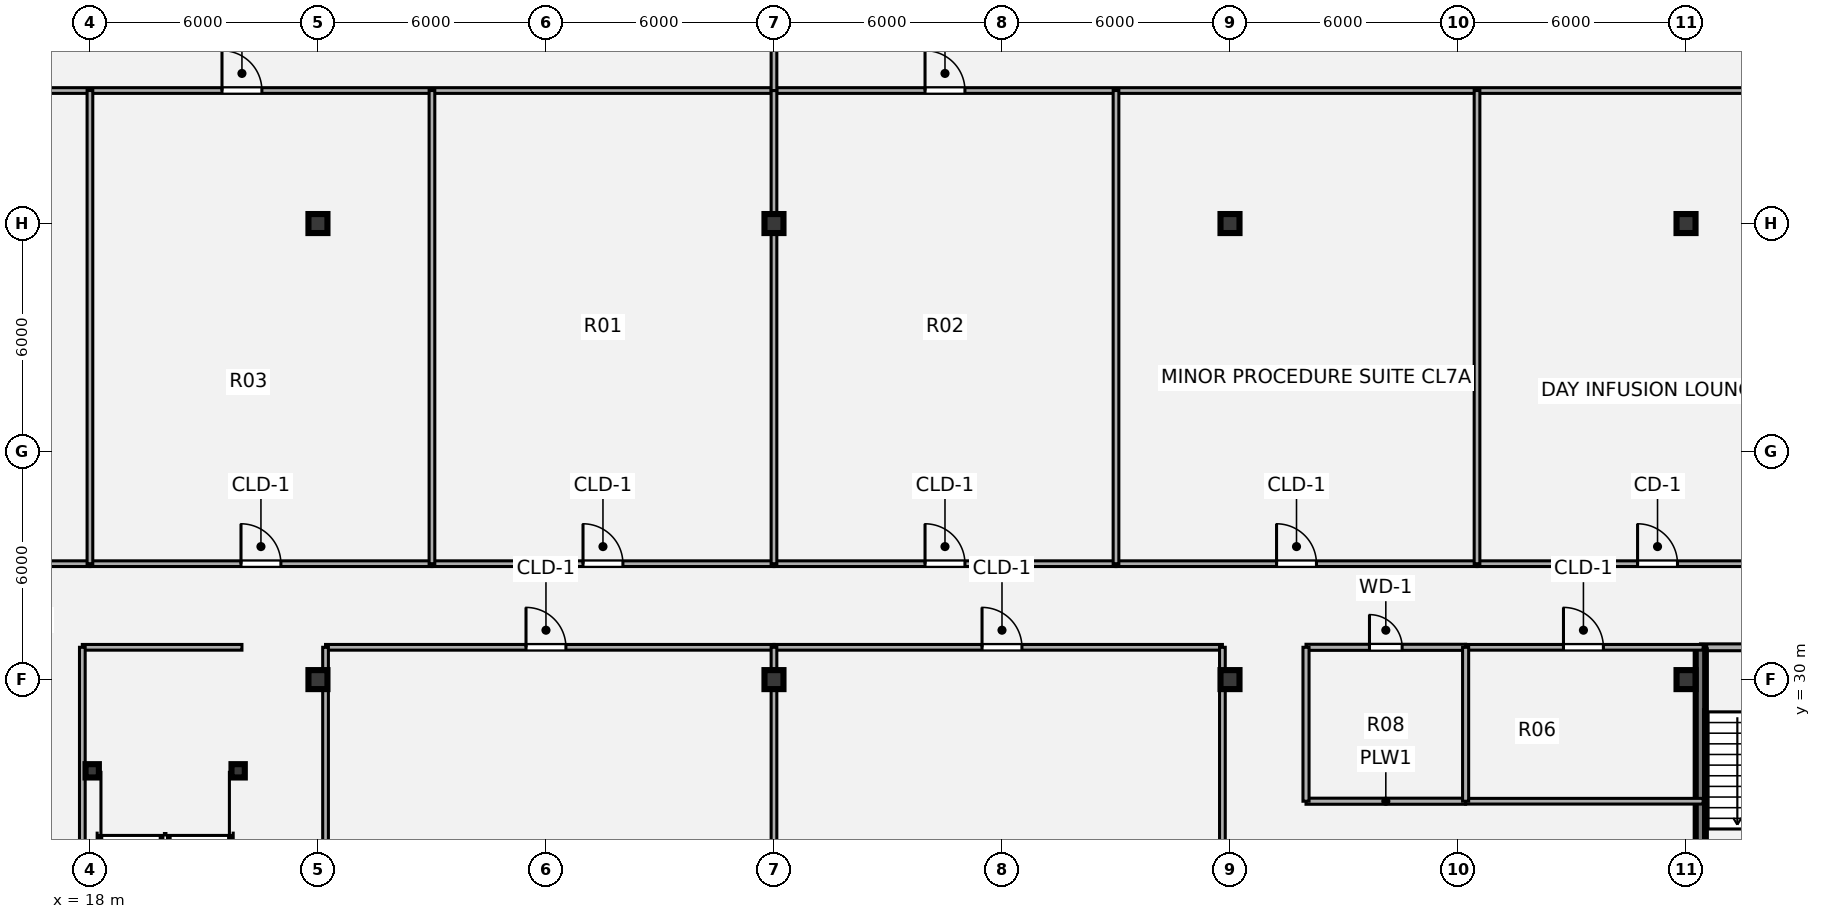
"""IFC4 building model, lengths in metres.
Left out: names, types, materials, properties, quantities, classifications, styles, units other than length and angle.
Written with IfcOpenShell. Run it as: python <this file> out.ifc"""

import sys

from ifc_helpers import new_model, si_unit, direction, frame, frame_2d, origin, origin_2d, place, context, subcontext, project, spatial, rectangle, hollow_rectangle, i_section, extrude, source, transform, mapped, element, fill, save


model = new_model("IFC4")
c1 = context("Model", 3, precision=1e-05, world=origin(), true_north=direction((0.0, 1.0)))
c2 = subcontext(c1, "Body", "Model", "MODEL_VIEW")
j1 = project(units=[si_unit("LENGTHUNIT", "METRE"), si_unit("PLANEANGLEUNIT", "RADIAN")], contexts=[c1])
p1 = place(None, origin())
s1 = spatial("IfcSite", under=j1, at=p1, CompositionType="ELEMENT")
p2 = place(p1, origin())
s2 = spatial("IfcBuilding", under=s1, at=p2, CompositionType="ELEMENT")
p3 = place(p2, frame((0.0, 0.0, 5.4)))
s3 = spatial("IfcBuildingStorey", under=s2, at=p3, CompositionType="ELEMENT", Elevation=5.4)
m1 = source(origin(), c2, "Body", "SweptSolid", [
    extrude(i_section(OverallWidth=0.5, OverallDepth=0.5, WebThickness=0.028, FlangeThickness=0.045, at=origin_2d()), origin(), (0.0, 0.0, 1.0), 4.32),
])
for number, where, z_axis, x_axis in (
    (1, (24.0, 30.0, 0.0), (0.0, 0.0, 1.0), (1.0, 0.0, 0.0)),
    (2, (36.0, 30.0, 0.0), (0.0, 0.0, 1.0), (1.0, 0.0, 0.0)),
    (3, (48.0, 30.0, 0.0), (0.0, 0.0, 1.0), (1.0, 0.0, 0.0)),
    (4, (60.0, 30.0, 0.0), (0.0, 0.0, 1.0), (1.0, 0.0, 0.0)),
    (5, (24.0, 42.0, 0.0), (0.0, 0.0, 1.0), (1.0, 0.0, 0.0)),
    (6, (36.0, 42.0, 0.0), (0.0, 0.0, 1.0), (1.0, 0.0, 0.0)),
    (7, (48.0, 42.0, 0.0), (0.0, 0.0, 1.0), (1.0, 0.0, 0.0)),
    (8, (60.0, 42.0, 0.0), (0.0, 0.0, 1.0), (1.0, 0.0, 0.0)),
):
    element("IfcColumn", number, at=place(p3, frame(where, z_axis=z_axis, x_axis=x_axis)), inside=s3, PredefinedType="COLUMN", context=c2, shape_type="MappedRepresentation", body=[
        mapped(m1, transform((0.0, 0.0, 0.0), x_axis=(1.0, 0.0, 0.0), y_axis=(0.0, 1.0, 0.0), z_axis=(0.0, 0.0, 1.0), scale=1.0)),
    ])
m2 = source(origin(), c2, "Body", "SweptSolid", [
    extrude(hollow_rectangle(XDim=0.35, YDim=0.35, WallThickness=0.016, OuterFilletRadius=0.032, at=origin_2d()), origin(), (0.0, 0.0, 1.0), 4.32),
])
for number, where, z_axis, x_axis in (
    (9, (18.06, 27.6, 0.0), (0.0, 0.0, 1.0), (1.0, 0.0, 0.0)),
    (10, (21.9, 27.6, 0.0), (0.0, 0.0, 1.0), (1.0, 0.0, 0.0)),
):
    element("IfcColumn", number, at=place(p3, frame(where, z_axis=z_axis, x_axis=x_axis)), inside=s3, PredefinedType="COLUMN", context=c2, shape_type="MappedRepresentation", body=[
        mapped(m2, transform((0.0, 0.0, 0.0), x_axis=(1.0, 0.0, 0.0), y_axis=(0.0, 1.0, 0.0), z_axis=(0.0, 0.0, 1.0), scale=1.0)),
    ])
p4 = place(p3, frame((60.38, 30.85, 0.0), z_axis=(0.0, 0.0, 1.0), x_axis=(1.0, 0.0, 0.0)))
e11 = element("IfcWall", 11, at=p4, inside=s3, PredefinedType="PARTITIONING", context=c2, shape_type="SweptSolid", body=[
    extrude(rectangle(XDim=3.74, YDim=0.18, at=frame_2d((1.87, 0.0))), origin(), (0.0, 0.0, 1.0), 4.04),
])
p5 = place(p4, frame((1.35, 0.0, 0.0)))
e12 = element("IfcOpeningElement", 12, at=p5, cuts=e11, PredefinedType="OPENING", context=c2, shape_type="SweptSolid", body=[
    extrude(rectangle(XDim=1.1, YDim=2.1, at=origin_2d()), frame((0.55, 0.1, 1.05), z_axis=(0.0, -1.0, 0.0), x_axis=(1.0, 0.0, 0.0)), (0.0, 0.0, 1.0), 0.2),
])
p6 = place(p3, frame((60.38, 23.38, 0.0), z_axis=(0.0, 0.0, 1.0), x_axis=(0.0, 1.0, 0.0)))
e13 = element("IfcWall", 13, at=p6, inside=s3, PredefinedType="SHEAR", context=c2, shape_type="SweptSolid", body=[
    extrude(rectangle(XDim=7.47, YDim=0.25, at=frame_2d((3.735, 0.0))), origin(), (0.0, 0.0, 1.0), 4.32),
])
p7 = place(p3, frame((50.0, 26.8, 0.0), z_axis=(0.0, 0.0, 1.0), x_axis=(1.0, 0.0, 0.0)))
e14 = element("IfcWall", 14, at=p7, inside=s3, PredefinedType="PLUMBINGWALL", context=c2, shape_type="SweptSolid", body=[
    extrude(rectangle(XDim=4.2, YDim=0.16, at=frame_2d((2.1, 0.0))), origin(), (0.0, 0.0, 1.0), 4.01),
])
p8 = place(p3, frame((54.2, 26.8, 0.0), z_axis=(0.0, 0.0, 1.0), x_axis=(1.0, 0.0, 0.0)))
e15 = element("IfcWall", 15, at=p8, inside=s3, PredefinedType="PARTITIONING", context=c2, shape_type="SweptSolid", body=[
    extrude(rectangle(XDim=6.25, YDim=0.15, at=frame_2d((3.125, 0.0))), origin(), (0.0, 0.0, 1.0), 4.01),
])
p9 = place(p3, frame((17.8, 30.85, 0.0), z_axis=(0.0, 0.0, 1.0), x_axis=(1.0, 0.0, 0.0)))
e16 = element("IfcWall", 16, at=p9, inside=s3, PredefinedType="PARTITIONING", context=c2, shape_type="SweptSolid", body=[
    extrude(rectangle(XDim=4.2, YDim=0.15, at=frame_2d((2.1, 0.0))), origin(), (0.0, 0.0, 1.0), 4.01),
])
p10 = place(p3, frame((24.2, 30.85, 0.0), z_axis=(0.0, 0.0, 1.0), x_axis=(1.0, 0.0, 0.0)))
e17 = element("IfcWall", 17, at=p10, inside=s3, PredefinedType="PARTITIONING", context=c2, shape_type="SweptSolid", body=[
    extrude(rectangle(XDim=11.8, YDim=0.15, at=frame_2d((5.9, 0.0))), origin(), (0.0, 0.0, 1.0), 4.01),
])
p11 = place(p10, frame((5.275, 0.0, 0.0)))
e18 = element("IfcOpeningElement", 18, at=p11, cuts=e17, PredefinedType="OPENING", context=c2, shape_type="SweptSolid", body=[
    extrude(rectangle(XDim=1.05, YDim=2.1, at=origin_2d()), frame((0.525, 0.085, 1.05), z_axis=(0.0, -1.0, 0.0), x_axis=(1.0, 0.0, 0.0)), (0.0, 0.0, 1.0), 0.17),
])
p12 = place(p3, frame((36.0, 30.85, 0.0), z_axis=(0.0, 0.0, 1.0), x_axis=(1.0, 0.0, 0.0)))
e19 = element("IfcWall", 19, at=p12, inside=s3, PredefinedType="PARTITIONING", context=c2, shape_type="SweptSolid", body=[
    extrude(rectangle(XDim=11.8, YDim=0.15, at=frame_2d((5.9, 0.0))), origin(), (0.0, 0.0, 1.0), 4.01),
])
p13 = place(p12, frame((5.475, 0.0, 0.0)))
e20 = element("IfcOpeningElement", 20, at=p13, cuts=e19, PredefinedType="OPENING", context=c2, shape_type="SweptSolid", body=[
    extrude(rectangle(XDim=1.05, YDim=2.1, at=origin_2d()), frame((0.525, 0.085, 1.05), z_axis=(0.0, -1.0, 0.0), x_axis=(1.0, 0.0, 0.0)), (0.0, 0.0, 1.0), 0.17),
])
p14 = place(p3, frame((50.0, 30.85, 0.0), z_axis=(0.0, 0.0, 1.0), x_axis=(1.0, 0.0, 0.0)))
e21 = element("IfcWall", 21, at=p14, inside=s3, PredefinedType="PLUMBINGWALL", context=c2, shape_type="SweptSolid", body=[
    extrude(rectangle(XDim=4.2, YDim=0.16, at=frame_2d((2.1, 0.0))), origin(), (0.0, 0.0, 1.0), 4.01),
])
p15 = place(p14, frame((1.67, 0.0, 0.0)))
e22 = element("IfcOpeningElement", 22, at=p15, cuts=e21, PredefinedType="OPENING", context=c2, shape_type="SweptSolid", body=[
    extrude(rectangle(XDim=0.86, YDim=2.1, at=origin_2d()), frame((0.43, 0.09, 1.05), z_axis=(0.0, -1.0, 0.0), x_axis=(1.0, 0.0, 0.0)), (0.0, 0.0, 1.0), 0.18),
])
p16 = place(p3, frame((54.2, 30.85, 0.0), z_axis=(0.0, 0.0, 1.0), x_axis=(1.0, 0.0, 0.0)))
e23 = element("IfcWall", 23, at=p16, inside=s3, PredefinedType="PARTITIONING", context=c2, shape_type="SweptSolid", body=[
    extrude(rectangle(XDim=6.25, YDim=0.15, at=frame_2d((3.125, 0.0))), origin(), (0.0, 0.0, 1.0), 4.01),
])
p17 = place(p16, frame((2.575, 0.0, 0.0)))
e24 = element("IfcOpeningElement", 24, at=p17, cuts=e23, PredefinedType="OPENING", context=c2, shape_type="SweptSolid", body=[
    extrude(rectangle(XDim=1.05, YDim=2.1, at=origin_2d()), frame((0.525, 0.085, 1.05), z_axis=(0.0, -1.0, 0.0), x_axis=(1.0, 0.0, 0.0)), (0.0, 0.0, 1.0), 0.17),
])
p18 = place(p3, frame((7.08, 33.05, 0.0), z_axis=(0.0, 0.0, 1.0), x_axis=(1.0, 0.0, 0.0)))
e25 = element("IfcWall", 25, at=p18, inside=s3, PredefinedType="PARTITIONING", context=c2, shape_type="SweptSolid", body=[
    extrude(rectangle(XDim=10.92, YDim=0.15, at=frame_2d((5.46, 0.0))), origin(), (0.0, 0.0, 1.0), 4.01),
])
p19 = place(p18, frame((5.895, 0.0, 0.0)))
e26 = element("IfcOpeningElement", 26, at=p19, cuts=e25, PredefinedType="OPENING", context=c2, shape_type="SweptSolid", body=[
    extrude(rectangle(XDim=1.05, YDim=2.1, at=origin_2d()), frame((0.525, 0.085, 1.05), z_axis=(0.0, -1.0, 0.0), x_axis=(1.0, 0.0, 0.0)), (0.0, 0.0, 1.0), 0.17),
])
p20 = place(p3, frame((18.0, 33.05, 0.0), z_axis=(0.0, 0.0, 1.0), x_axis=(1.0, 0.0, 0.0)))
e27 = element("IfcWall", 27, at=p20, inside=s3, PredefinedType="PARTITIONING", context=c2, shape_type="SweptSolid", body=[
    extrude(rectangle(XDim=9.0, YDim=0.15, at=frame_2d((4.5, 0.0))), origin(), (0.0, 0.0, 1.0), 4.01),
])
p21 = place(p20, frame((3.975, 0.0, 0.0)))
e28 = element("IfcOpeningElement", 28, at=p21, cuts=e27, PredefinedType="OPENING", context=c2, shape_type="SweptSolid", body=[
    extrude(rectangle(XDim=1.05, YDim=2.1, at=origin_2d()), frame((0.525, 0.085, 1.05), z_axis=(0.0, -1.0, 0.0), x_axis=(1.0, 0.0, 0.0)), (0.0, 0.0, 1.0), 0.17),
])
p22 = place(p3, frame((27.0, 33.05, 0.0), z_axis=(0.0, 0.0, 1.0), x_axis=(1.0, 0.0, 0.0)))
e29 = element("IfcWall", 29, at=p22, inside=s3, PredefinedType="PARTITIONING", context=c2, shape_type="SweptSolid", body=[
    extrude(rectangle(XDim=9.0, YDim=0.15, at=frame_2d((4.5, 0.0))), origin(), (0.0, 0.0, 1.0), 4.01),
])
p23 = place(p22, frame((3.975, 0.0, 0.0)))
e30 = element("IfcOpeningElement", 30, at=p23, cuts=e29, PredefinedType="OPENING", context=c2, shape_type="SweptSolid", body=[
    extrude(rectangle(XDim=1.05, YDim=2.1, at=origin_2d()), frame((0.525, 0.085, 1.05), z_axis=(0.0, -1.0, 0.0), x_axis=(1.0, 0.0, 0.0)), (0.0, 0.0, 1.0), 0.17),
])
p24 = place(p3, frame((36.0, 33.05, 0.0), z_axis=(0.0, 0.0, 1.0), x_axis=(1.0, 0.0, 0.0)))
e31 = element("IfcWall", 31, at=p24, inside=s3, PredefinedType="PARTITIONING", context=c2, shape_type="SweptSolid", body=[
    extrude(rectangle(XDim=9.0, YDim=0.15, at=frame_2d((4.5, 0.0))), origin(), (0.0, 0.0, 1.0), 4.01),
])
p25 = place(p24, frame((3.975, 0.0, 0.0)))
e32 = element("IfcOpeningElement", 32, at=p25, cuts=e31, PredefinedType="OPENING", context=c2, shape_type="SweptSolid", body=[
    extrude(rectangle(XDim=1.05, YDim=2.1, at=origin_2d()), frame((0.525, 0.085, 1.05), z_axis=(0.0, -1.0, 0.0), x_axis=(1.0, 0.0, 0.0)), (0.0, 0.0, 1.0), 0.17),
])
p26 = place(p3, frame((45.0, 33.05, 0.0), z_axis=(0.0, 0.0, 1.0), x_axis=(1.0, 0.0, 0.0)))
e33 = element("IfcWall", 33, at=p26, inside=s3, PredefinedType="PARTITIONING", context=c2, shape_type="SweptSolid", body=[
    extrude(rectangle(XDim=9.5, YDim=0.15, at=frame_2d((4.75, 0.0))), origin(), (0.0, 0.0, 1.0), 4.01),
])
p27 = place(p26, frame((4.225, 0.0, 0.0)))
e34 = element("IfcOpeningElement", 34, at=p27, cuts=e33, PredefinedType="OPENING", context=c2, shape_type="SweptSolid", body=[
    extrude(rectangle(XDim=1.05, YDim=2.1, at=origin_2d()), frame((0.525, 0.085, 1.05), z_axis=(0.0, -1.0, 0.0), x_axis=(1.0, 0.0, 0.0)), (0.0, 0.0, 1.0), 0.17),
])
p28 = place(p3, frame((54.5, 33.05, 0.0), z_axis=(0.0, 0.0, 1.0), x_axis=(1.0, 0.0, 0.0)))
e35 = element("IfcWall", 35, at=p28, inside=s3, PredefinedType="PARTITIONING", context=c2, shape_type="SweptSolid", body=[
    extrude(rectangle(XDim=10.42, YDim=0.15, at=frame_2d((5.21, 0.0))), origin(), (0.0, 0.0, 1.0), 4.01),
])
p29 = place(p28, frame((4.225, 0.0, 0.0)))
e36 = element("IfcOpeningElement", 36, at=p29, cuts=e35, PredefinedType="OPENING", context=c2, shape_type="SweptSolid", body=[
    extrude(rectangle(XDim=1.05, YDim=2.1, at=origin_2d()), frame((0.525, 0.085, 1.05), z_axis=(0.0, -1.0, 0.0), x_axis=(1.0, 0.0, 0.0)), (0.0, 0.0, 1.0), 0.17),
])
p30 = place(p3, frame((7.08, 45.5, 0.0), z_axis=(0.0, 0.0, 1.0), x_axis=(1.0, 0.0, 0.0)))
e37 = element("IfcWall", 37, at=p30, inside=s3, PredefinedType="PARTITIONING", context=c2, shape_type="SweptSolid", body=[
    extrude(rectangle(XDim=28.92, YDim=0.15, at=frame_2d((14.46, 0.0))), origin(), (0.0, 0.0, 1.0), 4.01),
])
p31 = place(p30, frame((14.395, 0.0, 0.0)))
e38 = element("IfcOpeningElement", 38, at=p31, cuts=e37, PredefinedType="OPENING", context=c2, shape_type="SweptSolid", body=[
    extrude(rectangle(XDim=1.05, YDim=2.1, at=origin_2d()), frame((0.525, 0.085, 1.05), z_axis=(0.0, -1.0, 0.0), x_axis=(1.0, 0.0, 0.0)), (0.0, 0.0, 1.0), 0.17),
])
p32 = place(p3, frame((36.0, 45.5, 0.0), z_axis=(0.0, 0.0, 1.0), x_axis=(1.0, 0.0, 0.0)))
e39 = element("IfcWall", 39, at=p32, inside=s3, PredefinedType="PARTITIONING", context=c2, shape_type="SweptSolid", body=[
    extrude(rectangle(XDim=28.92, YDim=0.15, at=frame_2d((14.46, 0.0))), origin(), (0.0, 0.0, 1.0), 4.01),
])
p33 = place(p32, frame((3.975, 0.0, 0.0)))
e40 = element("IfcOpeningElement", 40, at=p33, cuts=e39, PredefinedType="OPENING", context=c2, shape_type="SweptSolid", body=[
    extrude(rectangle(XDim=1.05, YDim=2.1, at=origin_2d()), frame((0.525, 0.085, 1.05), z_axis=(0.0, -1.0, 0.0), x_axis=(1.0, 0.0, 0.0)), (0.0, 0.0, 1.0), 0.17),
])
p34 = place(p3, frame((17.8, 20.22, 0.0), z_axis=(0.0, 0.0, 1.0), x_axis=(0.0, 1.0, 0.0)))
e41 = element("IfcWall", 41, at=p34, inside=s3, PredefinedType="PARTITIONING", context=c2, shape_type="SweptSolid", body=[
    extrude(rectangle(XDim=10.63, YDim=0.15, at=frame_2d((5.315, 0.0))), origin(), (0.0, 0.0, 1.0), 3.666),
])
p35 = place(p3, frame((18.0, 33.05, 0.0), z_axis=(0.0, 0.0, 1.0), x_axis=(0.0, 1.0, 0.0)))
e42 = element("IfcWall", 42, at=p35, inside=s3, PredefinedType="PARTITIONING", context=c2, shape_type="SweptSolid", body=[
    extrude(rectangle(XDim=12.45, YDim=0.15, at=frame_2d((6.225, 0.0))), origin(), (0.0, 0.0, 1.0), 3.666),
])
p36 = place(p3, frame((24.2, 20.22, 0.0), z_axis=(0.0, 0.0, 1.0), x_axis=(0.0, 1.0, 0.0)))
e43 = element("IfcWall", 43, at=p36, inside=s3, PredefinedType="PARTITIONING", context=c2, shape_type="SweptSolid", body=[
    extrude(rectangle(XDim=10.63, YDim=0.15, at=frame_2d((5.315, 0.0))), origin(), (0.0, 0.0, 1.0), 3.225),
])
p37 = place(p3, frame((27.0, 33.05, 0.0), z_axis=(0.0, 0.0, 1.0), x_axis=(0.0, 1.0, 0.0)))
e44 = element("IfcWall", 44, at=p37, inside=s3, PredefinedType="PARTITIONING", context=c2, shape_type="SweptSolid", body=[
    extrude(rectangle(XDim=12.45, YDim=0.15, at=frame_2d((6.225, 0.0))), origin(), (0.0, 0.0, 1.0), 3.666),
])
p38 = place(p3, frame((36.0, 20.22, 0.0), z_axis=(0.0, 0.0, 1.0), x_axis=(0.0, 1.0, 0.0)))
e45 = element("IfcWall", 45, at=p38, inside=s3, PredefinedType="PARTITIONING", context=c2, shape_type="SweptSolid", body=[
    extrude(rectangle(XDim=10.63, YDim=0.15, at=frame_2d((5.315, 0.0))), origin(), (0.0, 0.0, 1.0), 3.225),
])
p39 = place(p3, frame((36.0, 33.05, 0.0), z_axis=(0.0, 0.0, 1.0), x_axis=(0.0, 1.0, 0.0)))
e46 = element("IfcWall", 46, at=p39, inside=s3, PredefinedType="PARTITIONING", context=c2, shape_type="SweptSolid", body=[
    extrude(rectangle(XDim=12.45, YDim=0.15, at=frame_2d((6.225, 0.0))), origin(), (0.0, 0.0, 1.0), 3.225),
])
p40 = place(p3, frame((36.0, 45.5, 0.0), z_axis=(0.0, 0.0, 1.0), x_axis=(0.0, 1.0, 0.0)))
e47 = element("IfcWall", 47, at=p40, inside=s3, PredefinedType="PARTITIONING", context=c2, shape_type="SweptSolid", body=[
    extrude(rectangle(XDim=13.02, YDim=0.15, at=frame_2d((6.51, 0.0))), origin(), (0.0, 0.0, 1.0), 3.225),
])
p41 = place(p3, frame((45.0, 33.05, 0.0), z_axis=(0.0, 0.0, 1.0), x_axis=(0.0, 1.0, 0.0)))
e48 = element("IfcWall", 48, at=p41, inside=s3, PredefinedType="PARTITIONING", context=c2, shape_type="SweptSolid", body=[
    extrude(rectangle(XDim=12.45, YDim=0.15, at=frame_2d((6.225, 0.0))), origin(), (0.0, 0.0, 1.0), 3.666),
])
p42 = place(p3, frame((47.8, 20.22, 0.0), z_axis=(0.0, 0.0, 1.0), x_axis=(0.0, 1.0, 0.0)))
e49 = element("IfcWall", 49, at=p42, inside=s3, PredefinedType="PARTITIONING", context=c2, shape_type="SweptSolid", body=[
    extrude(rectangle(XDim=10.63, YDim=0.15, at=frame_2d((5.315, 0.0))), origin(), (0.0, 0.0, 1.0), 3.225),
])
for number, where, z_axis, x_axis in (
    (50, (50.0, 26.8, 0.0), (0.0, 0.0, 1.0), (0.0, 1.0, 0.0)),
    (51, (54.2, 26.8, 0.0), (0.0, 0.0, 1.0), (0.0, 1.0, 0.0)),
):
    element("IfcWall", number, at=place(p3, frame(where, z_axis=z_axis, x_axis=x_axis)), inside=s3, PredefinedType="PLUMBINGWALL", context=c2, shape_type="SweptSolid", body=[
        extrude(rectangle(XDim=4.05, YDim=0.16, at=frame_2d((2.025, 0.0))), origin(), (0.0, 0.0, 1.0), 3.666),
    ])
p43 = place(p3, frame((54.5, 33.05, 0.0), z_axis=(0.0, 0.0, 1.0), x_axis=(0.0, 1.0, 0.0)))
e52 = element("IfcWall", 52, at=p43, inside=s3, PredefinedType="PARTITIONING", context=c2, shape_type="SweptSolid", body=[
    extrude(rectangle(XDim=12.45, YDim=0.15, at=frame_2d((6.225, 0.0))), origin(), (0.0, 0.0, 1.0), 3.666),
])
m3 = source(origin(), c2, "Body", "SweptSolid", [
    extrude(rectangle(XDim=1.05, YDim=2.1, at=origin_2d()), frame((0.525, 0.025, 1.05), z_axis=(0.0, -1.0, 0.0), x_axis=(1.0, 0.0, 0.0)), (0.0, 0.0, 1.0), 0.05),
])
p44 = place(p11, origin())
e53 = element("IfcDoor", 53, at=p44, inside=s3, OperationType="SINGLE_SWING_LEFT", PredefinedType="DOOR", context=c2, shape_type="MappedRepresentation", body=[
    mapped(m3, transform((0.0, 0.0, 0.0), x_axis=(1.0, 0.0, 0.0), y_axis=(0.0, 1.0, 0.0), z_axis=(0.0, 0.0, 1.0), scale=1.0)),
])
fill(e18, e53)
p45 = place(p13, origin())
e54 = element("IfcDoor", 54, at=p45, inside=s3, OperationType="SINGLE_SWING_LEFT", PredefinedType="DOOR", context=c2, shape_type="MappedRepresentation", body=[
    mapped(m3, transform((0.0, 0.0, 0.0), x_axis=(1.0, 0.0, 0.0), y_axis=(0.0, 1.0, 0.0), z_axis=(0.0, 0.0, 1.0), scale=1.0)),
])
fill(e20, e54)
m4 = source(origin(), c2, "Body", "SweptSolid", [
    extrude(rectangle(XDim=0.86, YDim=2.1, at=origin_2d()), frame((0.43, 0.025, 1.05), z_axis=(0.0, -1.0, 0.0), x_axis=(1.0, 0.0, 0.0)), (0.0, 0.0, 1.0), 0.05),
])
p46 = place(p15, origin())
e55 = element("IfcDoor", 55, at=p46, inside=s3, OperationType="SINGLE_SWING_LEFT", PredefinedType="DOOR", context=c2, shape_type="MappedRepresentation", body=[
    mapped(m4, transform((0.0, 0.0, 0.0), x_axis=(1.0, 0.0, 0.0), y_axis=(0.0, 1.0, 0.0), z_axis=(0.0, 0.0, 1.0), scale=1.0)),
])
fill(e22, e55)
p47 = place(p17, origin())
e56 = element("IfcDoor", 56, at=p47, inside=s3, OperationType="SINGLE_SWING_LEFT", PredefinedType="DOOR", context=c2, shape_type="MappedRepresentation", body=[
    mapped(m3, transform((0.0, 0.0, 0.0), x_axis=(1.0, 0.0, 0.0), y_axis=(0.0, 1.0, 0.0), z_axis=(0.0, 0.0, 1.0), scale=1.0)),
])
fill(e24, e56)
p48 = place(p21, origin())
e57 = element("IfcDoor", 57, at=p48, inside=s3, OperationType="SINGLE_SWING_LEFT", PredefinedType="DOOR", context=c2, shape_type="MappedRepresentation", body=[
    mapped(m3, transform((0.0, 0.0, 0.0), x_axis=(1.0, 0.0, 0.0), y_axis=(0.0, 1.0, 0.0), z_axis=(0.0, 0.0, 1.0), scale=1.0)),
])
fill(e28, e57)
p49 = place(p23, origin())
e58 = element("IfcDoor", 58, at=p49, inside=s3, OperationType="SINGLE_SWING_LEFT", PredefinedType="DOOR", context=c2, shape_type="MappedRepresentation", body=[
    mapped(m3, transform((0.0, 0.0, 0.0), x_axis=(1.0, 0.0, 0.0), y_axis=(0.0, 1.0, 0.0), z_axis=(0.0, 0.0, 1.0), scale=1.0)),
])
fill(e30, e58)
p50 = place(p25, origin())
e59 = element("IfcDoor", 59, at=p50, inside=s3, OperationType="SINGLE_SWING_LEFT", PredefinedType="DOOR", context=c2, shape_type="MappedRepresentation", body=[
    mapped(m3, transform((0.0, 0.0, 0.0), x_axis=(1.0, 0.0, 0.0), y_axis=(0.0, 1.0, 0.0), z_axis=(0.0, 0.0, 1.0), scale=1.0)),
])
fill(e32, e59)
p51 = place(p27, origin())
e60 = element("IfcDoor", 60, at=p51, inside=s3, OperationType="SINGLE_SWING_LEFT", PredefinedType="DOOR", context=c2, shape_type="MappedRepresentation", body=[
    mapped(m3, transform((0.0, 0.0, 0.0), x_axis=(1.0, 0.0, 0.0), y_axis=(0.0, 1.0, 0.0), z_axis=(0.0, 0.0, 1.0), scale=1.0)),
])
fill(e34, e60)
m5 = source(origin(), c2, "Body", "SweptSolid", [
    extrude(rectangle(XDim=1.05, YDim=2.1, at=origin_2d()), frame((0.525, 0.025, 1.05), z_axis=(0.0, -1.0, 0.0), x_axis=(1.0, 0.0, 0.0)), (0.0, 0.0, 1.0), 0.05),
])
p52 = place(p29, origin())
e61 = element("IfcDoor", 61, at=p52, inside=s3, OperationType="SINGLE_SWING_LEFT", PredefinedType="DOOR", context=c2, shape_type="MappedRepresentation", body=[
    mapped(m5, transform((0.0, 0.0, 0.0), x_axis=(1.0, 0.0, 0.0), y_axis=(0.0, 1.0, 0.0), z_axis=(0.0, 0.0, 1.0), scale=1.0)),
])
fill(e36, e61)
p53 = place(p31, origin())
e62 = element("IfcDoor", 62, at=p53, inside=s3, OperationType="SINGLE_SWING_LEFT", PredefinedType="DOOR", context=c2, shape_type="MappedRepresentation", body=[
    mapped(m3, transform((0.0, 0.0, 0.0), x_axis=(1.0, 0.0, 0.0), y_axis=(0.0, 1.0, 0.0), z_axis=(0.0, 0.0, 1.0), scale=1.0)),
])
fill(e38, e62)
p54 = place(p33, origin())
e63 = element("IfcDoor", 63, at=p54, inside=s3, OperationType="SINGLE_SWING_LEFT", PredefinedType="DOOR", context=c2, shape_type="MappedRepresentation", body=[
    mapped(m3, transform((0.0, 0.0, 0.0), x_axis=(1.0, 0.0, 0.0), y_axis=(0.0, 1.0, 0.0), z_axis=(0.0, 0.0, 1.0), scale=1.0)),
])
fill(e40, e63)
save(model, sys.argv[1])
